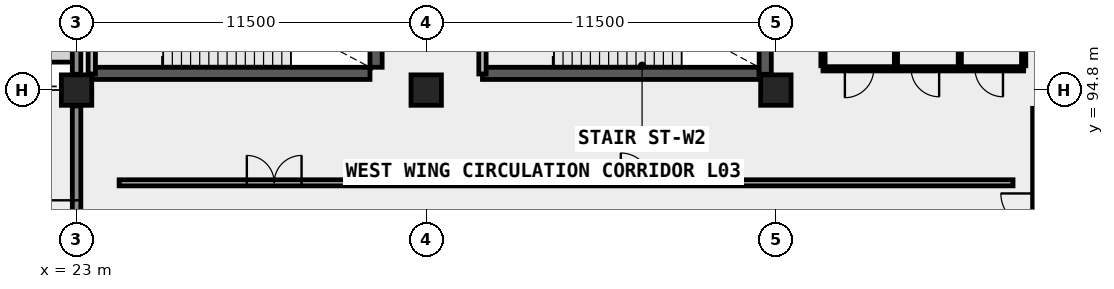
"""IFC4 building model, lengths in metres.
Left out: names, types, materials, properties, quantities, classifications, styles, units other than length and angle.
Written with IfcOpenShell. Run it as: python <this file> out.ifc"""

import sys

from ifc_helpers import new_model, si_unit, direction, frame, frame_2d, origin, origin_2d, place, context, subcontext, project, spatial, rectangle, extrude, element, fill, save


model = new_model("IFC4")
c1 = context("Model", 3, precision=1e-05, world=origin(), true_north=direction((0.0, 1.0)))
c2 = subcontext(c1, "Body", "Model", "MODEL_VIEW")
j1 = project(units=[si_unit("LENGTHUNIT", "METRE"), si_unit("PLANEANGLEUNIT", "RADIAN")], contexts=[c1])
p1 = place(None, origin())
s1 = spatial("IfcSite", under=j1, at=p1, CompositionType="ELEMENT")
p2 = place(p1, origin())
s2 = spatial("IfcBuilding", under=s1, at=p2, CompositionType="ELEMENT")
p3 = place(p2, frame((0.0, 0.0, 13.8)))
s3 = spatial("IfcBuildingStorey", under=s2, at=p3, CompositionType="ELEMENT", Elevation=13.8)
for number, where, z_axis, x_axis in (
    (1, (23.0, 94.8, 0.0), (0.0, 0.0, 1.0), (1.0, 0.0, 0.0)),
    (2, (34.5, 94.8, 0.0), (0.0, 0.0, 1.0), (1.0, 0.0, 0.0)),
    (3, (46.0, 94.8, 0.0), (0.0, 0.0, 1.0), (1.0, 0.0, 0.0)),
):
    element("IfcColumn", number, at=place(p3, frame(where, z_axis=z_axis, x_axis=x_axis)), inside=s3, PredefinedType="COLUMN", context=c2, shape_type="SweptSolid", body=[
        extrude(rectangle(XDim=1.0, YDim=1.0, at=origin_2d()), origin(), (0.0, 0.0, 1.0), 4.5),
    ])
p4 = place(p3, frame((23.5, 95.35, 0.0), z_axis=(0.0, 0.0, 1.0), x_axis=(1.0, 0.0, 0.0)))
e4 = element("IfcWall", 4, at=p4, inside=s3, PredefinedType="SHEAR", context=c2, shape_type="SweptSolid", body=[
    extrude(rectangle(XDim=9.15, YDim=0.4, at=frame_2d((4.575, 0.0))), origin(), (0.0, 0.0, 1.0), 4.5),
])
p5 = place(p3, frame((32.85, 95.55, 0.0), z_axis=(0.0, 0.0, 1.0), x_axis=(0.0, 1.0, 0.0)))
e5 = element("IfcWall", 5, at=p5, inside=s3, PredefinedType="SHEAR", context=c2, shape_type="SweptSolid", body=[
    extrude(rectangle(XDim=3.6, YDim=0.4, at=frame_2d((1.8, 0.0))), origin(), (0.0, 0.0, 1.0), 4.5),
])
p6 = place(p3, frame((36.35, 95.35, 0.0), z_axis=(0.0, 0.0, 1.0), x_axis=(1.0, 0.0, 0.0)))
e6 = element("IfcWall", 6, at=p6, inside=s3, PredefinedType="SHEAR", context=c2, shape_type="SweptSolid", body=[
    extrude(rectangle(XDim=9.1, YDim=0.4, at=frame_2d((4.55, 0.0))), origin(), (0.0, 0.0, 1.0), 4.5),
])
p7 = place(p3, frame((45.65, 95.32, 0.0), z_axis=(0.0, 0.0, 1.0), x_axis=(0.0, 1.0, 0.0)))
e7 = element("IfcWall", 7, at=p7, inside=s3, PredefinedType="SHEAR", context=c2, shape_type="SweptSolid", body=[
    extrude(rectangle(XDim=3.83, YDim=0.4, at=frame_2d((1.915, 0.0))), origin(), (0.0, 0.0, 1.0), 4.5),
])
p8 = place(p3, frame((23.0, 86.27, 0.0), z_axis=(0.0, 0.0, 1.0), x_axis=(0.0, 1.0, 0.0)))
e8 = element("IfcWall", 8, at=p8, inside=s3, PredefinedType="SOLIDWALL", context=c2, shape_type="SweptSolid", body=[
    extrude(rectangle(XDim=8.01, YDim=0.28, at=frame_2d((4.005, 0.0))), origin(), (0.0, 0.0, 1.0), 3.45),
])
p9 = place(p8, frame((3.105, 0.0, 0.0)))
e9 = element("IfcOpeningElement", 9, at=p9, cuts=e8, PredefinedType="OPENING", context=c2, shape_type="SweptSolid", body=[
    extrude(rectangle(XDim=1.8, YDim=2.25, at=frame_2d((0.9, 1.125))), frame((0.0, 0.15, 0.0), z_axis=(0.0, -1.0, 0.0), x_axis=(1.0, 0.0, 0.0)), (0.0, 0.0, 1.0), 0.3),
])
p10 = place(p3, frame((23.0, 95.32, 0.0), z_axis=(0.0, 0.0, 1.0), x_axis=(0.0, 1.0, 0.0)))
e10 = element("IfcWall", 10, at=p10, inside=s3, PredefinedType="SOLIDWALL", context=c2, shape_type="SweptSolid", body=[
    extrude(rectangle(XDim=8.96, YDim=0.28, at=frame_2d((4.48, 0.0))), origin(), (0.0, 0.0, 1.0), 3.45),
])
p11 = place(p10, frame((0.89, 0.0, 0.85)))
e11 = element("IfcOpeningElement", 11, at=p11, cuts=e10, PredefinedType="OPENING", context=c2, shape_type="SweptSolid", body=[
    extrude(rectangle(XDim=1.8, YDim=1.95, at=frame_2d((0.9, 0.975))), frame((0.0, 0.15, 0.0), z_axis=(0.0, -1.0, 0.0), x_axis=(1.0, 0.0, 0.0)), (0.0, 0.0, 1.0), 0.3),
])
p12 = place(p10, frame((3.58, 0.0, 0.85)))
e12 = element("IfcOpeningElement", 12, at=p12, cuts=e10, PredefinedType="OPENING", context=c2, shape_type="SweptSolid", body=[
    extrude(rectangle(XDim=1.8, YDim=1.95, at=frame_2d((0.9, 0.975))), frame((0.0, 0.15, 0.0), z_axis=(0.0, -1.0, 0.0), x_axis=(1.0, 0.0, 0.0)), (0.0, 0.0, 1.0), 0.3),
])
p13 = place(p10, frame((6.27, 0.0, 0.85)))
e13 = element("IfcOpeningElement", 13, at=p13, cuts=e10, PredefinedType="OPENING", context=c2, shape_type="SweptSolid", body=[
    extrude(rectangle(XDim=1.8, YDim=1.95, at=frame_2d((0.9, 0.975))), frame((0.0, 0.15, 0.0), z_axis=(0.0, -1.0, 0.0), x_axis=(1.0, 0.0, 0.0)), (0.0, 0.0, 1.0), 0.3),
])
p14 = place(p3, frame((23.5, 95.33, 0.0), z_axis=(0.0, 0.0, 1.0), x_axis=(0.0, 1.0, 0.0)))
e14 = element("IfcWall", 14, at=p14, inside=s3, PredefinedType="SOLIDWALL", context=c2, shape_type="SweptSolid", body=[
    extrude(rectangle(XDim=4.04, YDim=0.24, at=frame_2d((2.02, 0.0))), origin(), (0.0, 0.0, 1.0), 4.22),
])
p15 = place(p14, frame((1.45, 0.0, 0.0)))
e15 = element("IfcOpeningElement", 15, at=p15, cuts=e14, PredefinedType="OPENING", context=c2, shape_type="SweptSolid", body=[
    extrude(rectangle(XDim=1.13, YDim=2.15, at=frame_2d((0.565, 1.075))), frame((0.0, 0.13, 0.0), z_axis=(0.0, -1.0, 0.0), x_axis=(1.0, 0.0, 0.0)), (0.0, 0.0, 1.0), 0.26),
])
p16 = place(p3, frame((36.35, 95.33, 0.0), z_axis=(0.0, 0.0, 1.0), x_axis=(0.0, 1.0, 0.0)))
e16 = element("IfcWall", 16, at=p16, inside=s3, PredefinedType="SOLIDWALL", context=c2, shape_type="SweptSolid", body=[
    extrude(rectangle(XDim=4.04, YDim=0.24, at=frame_2d((2.02, 0.0))), origin(), (0.0, 0.0, 1.0), 4.22),
])
p17 = place(p16, frame((1.45, 0.0, 0.0)))
e17 = element("IfcOpeningElement", 17, at=p17, cuts=e16, PredefinedType="OPENING", context=c2, shape_type="SweptSolid", body=[
    extrude(rectangle(XDim=1.13, YDim=2.15, at=frame_2d((0.565, 1.075))), frame((0.0, 0.13, 0.0), z_axis=(0.0, -1.0, 0.0), x_axis=(1.0, 0.0, 0.0)), (0.0, 0.0, 1.0), 0.26),
])
p18 = place(p3, frame((47.55, 95.5, 0.0), z_axis=(0.0, 0.0, 1.0), x_axis=(1.0, 0.0, 0.0)))
e18 = element("IfcWall", 18, at=p18, inside=s3, PredefinedType="PLUMBINGWALL", context=c2, shape_type="SweptSolid", body=[
    extrude(rectangle(XDim=6.6, YDim=0.14, at=frame_2d((3.3, 0.0))), origin(), (0.0, 0.0, 1.0), 4.22),
])
p19 = place(p18, frame((0.72, 0.0, 0.0)))
e19 = element("IfcOpeningElement", 19, at=p19, cuts=e18, PredefinedType="OPENING", context=c2, shape_type="SweptSolid", body=[
    extrude(rectangle(XDim=0.95, YDim=2.1, at=frame_2d((0.475, 1.05))), frame((0.0, 0.08, 0.0), z_axis=(0.0, -1.0, 0.0), x_axis=(1.0, 0.0, 0.0)), (0.0, 0.0, 1.0), 0.16),
])
p20 = place(p18, frame((2.9, 0.0, 0.0)))
e20 = element("IfcOpeningElement", 20, at=p20, cuts=e18, PredefinedType="OPENING", context=c2, shape_type="SweptSolid", body=[
    extrude(rectangle(XDim=0.92, YDim=2.1, at=frame_2d((0.46, 1.05))), frame((0.0, 0.08, 0.0), z_axis=(0.0, -1.0, 0.0), x_axis=(1.0, 0.0, 0.0)), (0.0, 0.0, 1.0), 0.16),
])
p21 = place(p18, frame((5.0, 0.0, 0.0)))
e21 = element("IfcOpeningElement", 21, at=p21, cuts=e18, PredefinedType="OPENING", context=c2, shape_type="SweptSolid", body=[
    extrude(rectangle(XDim=0.92, YDim=2.1, at=frame_2d((0.46, 1.05))), frame((0.0, 0.08, 0.0), z_axis=(0.0, -1.0, 0.0), x_axis=(1.0, 0.0, 0.0)), (0.0, 0.0, 1.0), 0.16),
])
p22 = place(p3, frame((47.55, 95.6, 0.0), z_axis=(0.0, 0.0, 1.0), x_axis=(0.0, 1.0, 0.0)))
e22 = element("IfcWall", 22, at=p22, inside=s3, PredefinedType="PLUMBINGWALL", context=c2, shape_type="SweptSolid", body=[
    extrude(rectangle(XDim=2.85, YDim=0.14, at=frame_2d((1.425, 0.0))), origin(), (0.0, 0.0, 1.0), 4.22),
])
p23 = place(p3, frame((49.95, 95.6, 0.0), z_axis=(0.0, 0.0, 1.0), x_axis=(0.0, 1.0, 0.0)))
e23 = element("IfcWall", 23, at=p23, inside=s3, PredefinedType="PARTITIONING", context=c2, shape_type="SweptSolid", body=[
    extrude(rectangle(XDim=2.85, YDim=0.105, at=frame_2d((1.425, 0.0))), origin(), (0.0, 0.0, 1.0), 3.7),
])
p24 = place(p3, frame((52.05, 95.6, 0.0), z_axis=(0.0, 0.0, 1.0), x_axis=(0.0, 1.0, 0.0)))
e24 = element("IfcWall", 24, at=p24, inside=s3, PredefinedType="PARTITIONING", context=c2, shape_type="SweptSolid", body=[
    extrude(rectangle(XDim=2.85, YDim=0.105, at=frame_2d((1.425, 0.0))), origin(), (0.0, 0.0, 1.0), 4.22),
])
p25 = place(p3, frame((54.15, 95.6, 0.0), z_axis=(0.0, 0.0, 1.0), x_axis=(0.0, 1.0, 0.0)))
e25 = element("IfcWall", 25, at=p25, inside=s3, PredefinedType="PLUMBINGWALL", context=c2, shape_type="SweptSolid", body=[
    extrude(rectangle(XDim=2.85, YDim=0.14, at=frame_2d((1.425, 0.0))), origin(), (0.0, 0.0, 1.0), 4.22),
])
p26 = place(p3, frame((24.4, 91.75, 0.0), z_axis=(0.0, 0.0, 1.0), x_axis=(1.0, 0.0, 0.0)))
e26 = element("IfcWall", 26, at=p26, inside=s3, PredefinedType="PARTITIONING", context=c2, shape_type="SweptSolid", body=[
    extrude(rectangle(XDim=29.4, YDim=0.2, at=frame_2d((14.7, 0.0))), origin(), (0.0, 0.0, 1.0), 4.22),
])
p27 = place(p26, frame((4.2, 0.0, 0.0)))
e27 = element("IfcOpeningElement", 27, at=p27, cuts=e26, PredefinedType="OPENING", context=c2, shape_type="SweptSolid", body=[
    extrude(rectangle(XDim=1.8, YDim=2.2, at=frame_2d((0.9, 1.1))), frame((0.0, 0.11, 0.0), z_axis=(0.0, -1.0, 0.0), x_axis=(1.0, 0.0, 0.0)), (0.0, 0.0, 1.0), 0.22),
])
p28 = place(p26, frame((16.5, 0.0, 0.0)))
e28 = element("IfcOpeningElement", 28, at=p28, cuts=e26, PredefinedType="OPENING", context=c2, shape_type="SweptSolid", body=[
    extrude(rectangle(XDim=0.98, YDim=2.15, at=frame_2d((0.49, 1.075))), frame((0.0, 0.11, 0.0), z_axis=(0.0, -1.0, 0.0), x_axis=(1.0, 0.0, 0.0)), (0.0, 0.0, 1.0), 0.22),
])
p29 = place(p3, frame((54.5, 86.4, 0.0), z_axis=(0.0, 0.0, 1.0), x_axis=(0.0, 1.0, 0.0)))
e29 = element("IfcWall", 29, at=p29, inside=s3, PredefinedType="MOVABLE", context=c2, shape_type="SweptSolid", body=[
    extrude(rectangle(XDim=7.8, YDim=0.11, at=frame_2d((3.9, 0.0))), origin(), (0.0, 0.0, 1.0), 4.22),
])
p30 = place(p29, frame((2.8, 0.0, 0.0)))
e30 = element("IfcOpeningElement", 30, at=p30, cuts=e29, PredefinedType="OPENING", context=c2, shape_type="SweptSolid", body=[
    extrude(rectangle(XDim=2.2, YDim=2.4, at=frame_2d((1.1, 1.2))), frame((0.0, 0.065, 0.0), z_axis=(0.0, -1.0, 0.0), x_axis=(1.0, 0.0, 0.0)), (0.0, 0.0, 1.0), 0.13),
])
p31 = place(p9, origin())
e31 = element("IfcDoor", 31, at=p31, inside=s3, OperationType="DOUBLE_DOOR_SINGLE_SWING", PredefinedType="DOOR", context=c2, shape_type="SweptSolid", body=[
    extrude(rectangle(XDim=1.8, YDim=2.25, at=frame_2d((0.9, 1.125))), frame((0.0, 0.025, 0.0), z_axis=(0.0, -1.0, 0.0), x_axis=(1.0, 0.0, 0.0)), (0.0, 0.0, 1.0), 0.05),
])
fill(e9, e31)
p32 = place(p19, frame((0.475, 0.0, 0.0), z_axis=(0.0, 0.0, 1.0), x_axis=(-1.0, 0.0, 0.0)))
e32 = element("IfcDoor", 32, at=p32, inside=s3, OperationType="SINGLE_SWING_LEFT", PredefinedType="DOOR", context=c2, shape_type="SweptSolid", body=[
    extrude(rectangle(XDim=0.95, YDim=2.1, at=frame_2d((0.0, 1.05))), frame((0.0, 0.025, 0.0), z_axis=(0.0, -1.0, 0.0), x_axis=(1.0, 0.0, 0.0)), (0.0, 0.0, 1.0), 0.05),
])
fill(e19, e32)
p33 = place(p20, origin())
e33 = element("IfcDoor", 33, at=p33, inside=s3, OperationType="SINGLE_SWING_RIGHT", PredefinedType="DOOR", context=c2, shape_type="SweptSolid", body=[
    extrude(rectangle(XDim=0.92, YDim=2.1, at=frame_2d((0.46, 1.05))), frame((0.0, 0.025, 0.0), z_axis=(0.0, -1.0, 0.0), x_axis=(1.0, 0.0, 0.0)), (0.0, 0.0, 1.0), 0.05),
])
fill(e20, e33)
p34 = place(p21, origin())
e34 = element("IfcDoor", 34, at=p34, inside=s3, OperationType="SINGLE_SWING_RIGHT", PredefinedType="DOOR", context=c2, shape_type="SweptSolid", body=[
    extrude(rectangle(XDim=0.92, YDim=2.1, at=frame_2d((0.46, 1.05))), frame((0.0, 0.025, 0.0), z_axis=(0.0, -1.0, 0.0), x_axis=(1.0, 0.0, 0.0)), (0.0, 0.0, 1.0), 0.05),
])
fill(e21, e34)
p35 = place(p27, origin())
e35 = element("IfcDoor", 35, at=p35, inside=s3, OperationType="DOUBLE_DOOR_SINGLE_SWING", PredefinedType="DOOR", context=c2, shape_type="SweptSolid", body=[
    extrude(rectangle(XDim=1.8, YDim=2.2, at=frame_2d((0.9, 1.1))), frame((0.0, 0.025, 0.0), z_axis=(0.0, -1.0, 0.0), x_axis=(1.0, 0.0, 0.0)), (0.0, 0.0, 1.0), 0.05),
])
fill(e27, e35)
p36 = place(p28, origin())
e36 = element("IfcDoor", 36, at=p36, inside=s3, OperationType="SINGLE_SWING_LEFT", PredefinedType="DOOR", context=c2, shape_type="SweptSolid", body=[
    extrude(rectangle(XDim=0.98, YDim=2.15, at=frame_2d((0.49, 1.075))), frame((0.0, 0.025, 0.0), z_axis=(0.0, -1.0, 0.0), x_axis=(1.0, 0.0, 0.0)), (0.0, 0.0, 1.0), 0.05),
])
fill(e28, e36)
p37 = place(p30, origin())
e37 = element("IfcDoor", 37, at=p37, inside=s3, OperationType="DOUBLE_DOOR_SINGLE_SWING", PredefinedType="DOOR", context=c2, shape_type="SweptSolid", body=[
    extrude(rectangle(XDim=2.2, YDim=2.4, at=frame_2d((1.1, 1.2))), frame((0.0, 0.025, 0.0), z_axis=(0.0, -1.0, 0.0), x_axis=(1.0, 0.0, 0.0)), (0.0, 0.0, 1.0), 0.05),
])
fill(e30, e37)
save(model, sys.argv[1])
